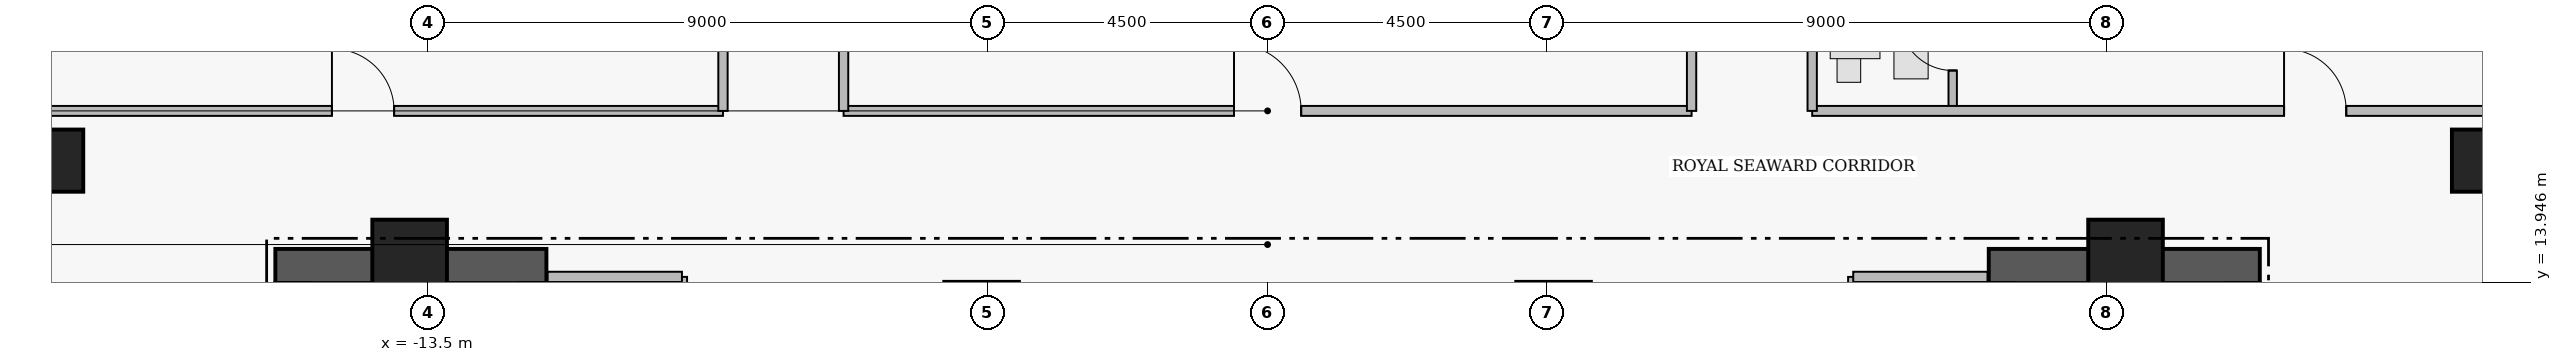
"""IFC4 building model, lengths in metres.
Left out: names, types, materials, properties, quantities, classifications, styles, units other than length and angle.
Written with IfcOpenShell. Run it as: python <this file> out.ifc"""

import sys

from ifc_helpers import new_model, si_unit, direction, frame, frame_2d, origin, origin_2d, place, context, subcontext, project, spatial, rectangle, extrude, element, fill, save


model = new_model("IFC4")
c1 = context("Model", 3, precision=1e-05, world=origin(), true_north=direction((0.0, 1.0)))
c2 = subcontext(c1, "Body", "Model", "MODEL_VIEW")
j1 = project(units=[si_unit("LENGTHUNIT", "METRE"), si_unit("PLANEANGLEUNIT", "RADIAN")], contexts=[c1])
p1 = place(None, origin())
s1 = spatial("IfcSite", under=j1, at=p1, CompositionType="ELEMENT")
p2 = place(p1, origin())
s2 = spatial("IfcBuilding", under=s1, at=p2, CompositionType="ELEMENT")
p3 = place(p2, frame((0.0, 0.0, 239.65)))
s3 = spatial("IfcBuildingStorey", under=s2, at=p3, CompositionType="ELEMENT", Elevation=239.65)
for number, where, z_axis, x_axis in (
    (1, (-15.96, 14.205, 0.0), (0.0, 0.0, 1.0), (1.0, 0.0, 0.0)),
    (2, (11.6, 14.205, 0.0), (0.0, 0.0, 1.0), (1.0, 0.0, 0.0)),
):
    element("IfcWall", number, at=place(p3, frame(where, z_axis=z_axis, x_axis=x_axis)), inside=s3, PredefinedType="SHEAR", context=c2, shape_type="SweptSolid", body=[
        extrude(rectangle(XDim=4.36, YDim=0.55, at=frame_2d((2.18, 0.0))), origin(), (0.0, 0.0, 1.0), 3.51),
    ])
for number, where, z_axis, x_axis in (
    (3, (-13.8, 14.35, 0.0), (0.0, 0.0, 1.0), (1.0, 0.0, 0.0)),
    (4, (-4.6, 13.35, 0.0), (0.0, 0.0, 1.0), (1.0, 0.0, 0.0)),
    (5, (4.6, 13.35, 0.0), (0.0, 0.0, 1.0), (1.0, 0.0, 0.0)),
    (6, (13.8, 14.35, 0.0), (0.0, 0.0, 1.0), (1.0, 0.0, 0.0)),
):
    element("IfcColumn", number, at=place(p3, frame(where, z_axis=z_axis, x_axis=x_axis)), inside=s3, PredefinedType="COLUMN", context=c2, shape_type="SweptSolid", body=[
        extrude(rectangle(XDim=1.2, YDim=1.2, at=origin_2d()), origin(), (0.0, 0.0, 1.0), 3.7),
    ])
for number, where, z_axis, x_axis in (
    (7, (-19.55, 15.9, 0.43), (0.0, 0.0, 1.0), (1.0, 0.0, 0.0)),
    (8, (19.55, 15.9, 0.43), (0.0, 0.0, 1.0), (1.0, 0.0, 0.0)),
):
    element("IfcColumn", number, at=place(p3, frame(where, z_axis=z_axis, x_axis=x_axis)), inside=s3, PredefinedType="COLUMN", context=c2, shape_type="SweptSolid", body=[
        extrude(rectangle(XDim=1.0, YDim=1.0, at=origin_2d()), origin(), (0.0, 0.0, 1.0), 3.27),
    ])
p4 = place(p3, frame((-6.82, 16.7, 0.0), z_axis=(0.0, 0.0, 1.0), x_axis=(1.0, 0.0, 0.0)))
e9 = element("IfcWall", 9, at=p4, inside=s3, PredefinedType="PARTITIONING", context=c2, shape_type="SweptSolid", body=[
    extrude(rectangle(XDim=13.64, YDim=0.16, at=frame_2d((6.82, 0.0))), origin(), (0.0, 0.0, 1.0), 3.076),
])
p5 = place(p4, frame((6.28, 0.0, 0.0)))
e10 = element("IfcOpeningElement", 10, at=p5, cuts=e9, PredefinedType="OPENING", context=c2, shape_type="SweptSolid", body=[
    extrude(rectangle(XDim=1.08, YDim=2.18, at=frame_2d((0.54, 1.09))), frame((0.0, 0.09, 0.0), z_axis=(0.0, -1.0, 0.0), x_axis=(1.0, 0.0, 0.0)), (0.0, 0.0, 1.0), 0.18),
])
p6 = place(p3, frame((-22.64, 16.7, 0.0), z_axis=(0.0, 0.0, 1.0), x_axis=(1.0, 0.0, 0.0)))
e11 = element("IfcWall", 11, at=p6, inside=s3, PredefinedType="PARTITIONING", context=c2, shape_type="SweptSolid", body=[
    extrude(rectangle(XDim=13.88, YDim=0.16, at=frame_2d((6.94, 0.0))), origin(), (0.0, 0.0, 1.0), 3.076),
])
p7 = place(p6, frame((7.59, 0.0, 0.0)))
e12 = element("IfcOpeningElement", 12, at=p7, cuts=e11, PredefinedType="OPENING", context=c2, shape_type="SweptSolid", body=[
    extrude(rectangle(XDim=1.0, YDim=2.15, at=frame_2d((0.5, 1.075))), frame((0.0, 0.09, 0.0), z_axis=(0.0, -1.0, 0.0), x_axis=(1.0, 0.0, 0.0)), (0.0, 0.0, 1.0), 0.18),
])
p8 = place(p3, frame((11.02, 16.7, 0.0), z_axis=(0.0, 0.0, 1.0), x_axis=(0.0, 1.0, 0.0)))
e13 = element("IfcWall", 13, at=p8, inside=s3, PredefinedType="PLUMBINGWALL", context=c2, shape_type="SweptSolid", body=[
    extrude(rectangle(XDim=2.36, YDim=0.135, at=frame_2d((1.18, 0.0))), origin(), (0.0, 0.0, 1.0), 3.48),
])
p9 = place(p8, frame((0.65, 0.0, 0.0)))
e14 = element("IfcOpeningElement", 14, at=p9, cuts=e13, PredefinedType="OPENING", context=c2, shape_type="SweptSolid", body=[
    extrude(rectangle(XDim=0.85, YDim=2.1, at=frame_2d((0.425, 1.05))), frame((0.0, 0.077, 0.0), z_axis=(0.0, -1.0, 0.0), x_axis=(1.0, 0.0, 0.0)), (0.0, 0.0, 1.0), 0.155),
])
p10 = place(p3, frame((8.76, 16.7, 0.0), z_axis=(0.0, 0.0, 1.0), x_axis=(1.0, 0.0, 0.0)))
e15 = element("IfcWall", 15, at=p10, inside=s3, PredefinedType="PARTITIONING", context=c2, shape_type="SweptSolid", body=[
    extrude(rectangle(XDim=13.88, YDim=0.16, at=frame_2d((6.94, 0.0))), origin(), (0.0, 0.0, 1.0), 3.076),
])
p11 = place(p10, frame((7.59, 0.0, 0.0)))
e16 = element("IfcOpeningElement", 16, at=p11, cuts=e15, PredefinedType="OPENING", context=c2, shape_type="SweptSolid", body=[
    extrude(rectangle(XDim=1.0, YDim=2.15, at=frame_2d((0.5, 1.075))), frame((0.0, 0.09, 0.0), z_axis=(0.0, -1.0, 0.0), x_axis=(1.0, 0.0, 0.0)), (0.0, 0.0, 1.0), 0.18),
])
p12 = place(p3, frame((-9.42, 11.07, 0.0), z_axis=(0.0, 0.0, 1.0), x_axis=(0.0, 1.0, 0.0)))
e17 = element("IfcWall", 17, at=p12, inside=s3, PredefinedType="PARTITIONING", context=c2, shape_type="SweptSolid", body=[
    extrude(rectangle(XDim=2.96, YDim=0.165, at=frame_2d((1.48, 0.0))), origin(), (0.0, 0.0, 1.0), 3.48),
])
p13 = place(p3, frame((-11.58, 14.03, 0.0), z_axis=(0.0, 0.0, 1.0), x_axis=(1.0, 0.0, 0.0)))
e18 = element("IfcWall", 18, at=p13, inside=s3, PredefinedType="PARTITIONING", context=c2, shape_type="SweptSolid", body=[
    extrude(rectangle(XDim=2.16, YDim=0.165, at=frame_2d((1.08, 0.0))), origin(), (0.0, 0.0, 1.0), 3.48),
])
p14 = place(p3, frame((9.42, 11.07, 0.0), z_axis=(0.0, 0.0, 1.0), x_axis=(0.0, 1.0, 0.0)))
e19 = element("IfcWall", 19, at=p14, inside=s3, PredefinedType="PARTITIONING", context=c2, shape_type="SweptSolid", body=[
    extrude(rectangle(XDim=2.96, YDim=0.165, at=frame_2d((1.48, 0.0))), origin(), (0.0, 0.0, 1.0), 3.48),
])
p15 = place(p3, frame((9.42, 14.03, 0.0), z_axis=(0.0, 0.0, 1.0), x_axis=(1.0, 0.0, 0.0)))
e20 = element("IfcWall", 20, at=p15, inside=s3, PredefinedType="PARTITIONING", context=c2, shape_type="SweptSolid", body=[
    extrude(rectangle(XDim=2.16, YDim=0.165, at=frame_2d((1.08, 0.0))), origin(), (0.0, 0.0, 1.0), 3.48),
])
for number, where, z_axis, x_axis in (
    (21, (-6.82, 16.7, 0.0), (0.0, 0.0, 1.0), (0.0, 1.0, 0.0)),
    (22, (6.82, 16.7, 0.0), (0.0, 0.0, 1.0), (0.0, 1.0, 0.0)),
):
    element("IfcWall", number, at=place(p3, frame(where, z_axis=z_axis, x_axis=x_axis)), inside=s3, PredefinedType="PARTITIONING", context=c2, shape_type="SweptSolid", body=[
        extrude(rectangle(XDim=10.22, YDim=0.15, at=frame_2d((5.11, 0.0))), origin(), (0.0, 0.0, 1.0), 3.48),
    ])
p16 = place(p3, frame((-8.76, 16.7, 0.0), z_axis=(0.0, 0.0, 1.0), x_axis=(0.0, 1.0, 0.0)))
e23 = element("IfcWall", 23, at=p16, inside=s3, PredefinedType="PARTITIONING", context=c2, shape_type="SweptSolid", body=[
    extrude(rectangle(XDim=6.95, YDim=0.15, at=frame_2d((3.475, 0.0))), origin(), (0.0, 0.0, 1.0), 3.48),
])
p17 = place(p3, frame((8.76, 16.7, 0.0), z_axis=(0.0, 0.0, 1.0), x_axis=(0.0, 1.0, 0.0)))
e24 = element("IfcWall", 24, at=p17, inside=s3, PredefinedType="PARTITIONING", context=c2, shape_type="SweptSolid", body=[
    extrude(rectangle(XDim=12.68, YDim=0.15, at=frame_2d((6.34, 0.0))), origin(), (0.0, 0.0, 1.0), 3.48),
])
p18 = place(p5, origin())
e25 = element("IfcDoor", 25, at=p18, inside=s3, OperationType="SINGLE_SWING_LEFT", PredefinedType="DOOR", context=c2, shape_type="SweptSolid", body=[
    extrude(rectangle(XDim=1.08, YDim=2.18, at=frame_2d((0.54, 1.09))), frame((0.0, 0.025, 0.0), z_axis=(0.0, -1.0, 0.0), x_axis=(1.0, 0.0, 0.0)), (0.0, 0.0, 1.0), 0.05),
])
fill(e10, e25)
p19 = place(p7, origin())
e26 = element("IfcDoor", 26, at=p19, inside=s3, OperationType="SINGLE_SWING_LEFT", PredefinedType="DOOR", context=c2, shape_type="SweptSolid", body=[
    extrude(rectangle(XDim=1.0, YDim=2.15, at=frame_2d((0.5, 1.075))), frame((0.0, 0.025, 0.0), z_axis=(0.0, -1.0, 0.0), x_axis=(1.0, 0.0, 0.0)), (0.0, 0.0, 1.0), 0.05),
])
fill(e12, e26)
p20 = place(p9, origin())
e27 = element("IfcDoor", 27, at=p20, inside=s3, OperationType="SINGLE_SWING_RIGHT", PredefinedType="DOOR", context=c2, shape_type="SweptSolid", body=[
    extrude(rectangle(XDim=0.85, YDim=2.1, at=frame_2d((0.425, 1.05))), frame((0.0, 0.025, 0.0), z_axis=(0.0, -1.0, 0.0), x_axis=(1.0, 0.0, 0.0)), (0.0, 0.0, 1.0), 0.05),
])
fill(e14, e27)
p21 = place(p11, origin())
e28 = element("IfcDoor", 28, at=p21, inside=s3, OperationType="SINGLE_SWING_LEFT", PredefinedType="DOOR", context=c2, shape_type="SweptSolid", body=[
    extrude(rectangle(XDim=1.0, YDim=2.15, at=frame_2d((0.5, 1.075))), frame((0.0, 0.025, 0.0), z_axis=(0.0, -1.0, 0.0), x_axis=(1.0, 0.0, 0.0)), (0.0, 0.0, 1.0), 0.05),
])
fill(e16, e28)
save(model, sys.argv[1])
